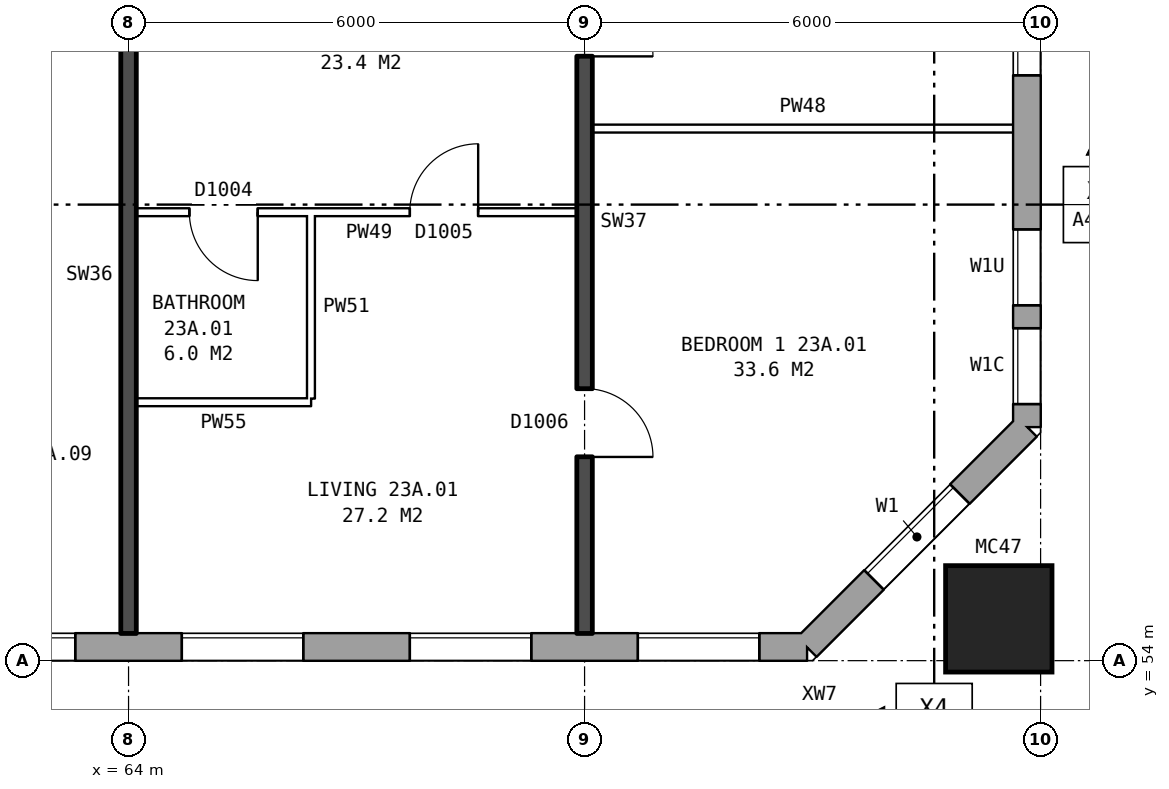
"""IFC4 building model, lengths in metres.
Left out: names, types, materials, properties, quantities, classifications, styles, units other than length and angle.
Written with IfcOpenShell. Run it as: python <this file> out.ifc"""

import sys

from ifc_helpers import new_model, si_unit, direction, frame, frame_2d, origin, origin_2d, place, context, subcontext, project, spatial, rectangle, hollow_rectangle, extrude, element, fill, save


model = new_model("IFC4")
c1 = context("Model", 3, precision=1e-05, world=origin(), true_north=direction((0.0, 1.0)))
c2 = subcontext(c1, "Body", "Model", "MODEL_VIEW")
j1 = project(units=[si_unit("LENGTHUNIT", "METRE"), si_unit("PLANEANGLEUNIT", "RADIAN")], contexts=[c1])
p1 = place(None, origin())
s1 = spatial("IfcSite", under=j1, at=p1, CompositionType="ELEMENT")
p2 = place(p1, origin())
s2 = spatial("IfcBuilding", under=s1, at=p2, CompositionType="ELEMENT")
p3 = place(p2, frame((0.0, 0.0, 84.0)))
s3 = spatial("IfcBuildingStorey", under=s2, at=p3, CompositionType="ELEMENT", Elevation=84.0)
p4 = place(p3, frame((75.45, 54.55, 0.0), z_axis=(0.0, 0.0, 1.0), x_axis=(1.0, 0.0, 0.0)))
e1 = element("IfcColumn", 1, at=p4, inside=s3, PredefinedType="COLUMN", context=c2, shape_type="SweptSolid", body=[
    extrude(hollow_rectangle(XDim=1.4, YDim=1.4, WallThickness=0.075, at=origin_2d()), origin(), (0.0, 0.0, 1.0), 3.1),
])
p5 = place(p3, frame((26.325, 54.18, 0.0), z_axis=(0.0, 0.0, 1.0), x_axis=(1.0, 0.0, 0.0)))
e2 = element("IfcWall", 2, at=p5, inside=s3, PredefinedType="STANDARD", context=c2, shape_type="SweptSolid", body=[
    extrude(rectangle(XDim=46.601, YDim=0.36, at=frame_2d((23.3, 0.0))), origin(), (0.0, 0.0, 1.0), 2.85),
])
p6 = place(p5, frame((2.375, 0.0, 0.8)))
e3 = element("IfcOpeningElement", 3, at=p6, cuts=e2, PredefinedType="OPENING", context=c2, shape_type="SweptSolid", body=[
    extrude(rectangle(XDim=1.6, YDim=1.8, at=frame_2d((0.8, 0.9))), frame((0.0, 0.19, 0.0), z_axis=(0.0, -1.0, 0.0), x_axis=(1.0, 0.0, 0.0)), (0.0, 0.0, 1.0), 0.38),
])
p7 = place(p5, frame((5.375, 0.0, 0.8)))
e4 = element("IfcOpeningElement", 4, at=p7, cuts=e2, PredefinedType="OPENING", context=c2, shape_type="SweptSolid", body=[
    extrude(rectangle(XDim=1.6, YDim=1.8, at=frame_2d((0.8, 0.9))), frame((0.0, 0.19, 0.0), z_axis=(0.0, -1.0, 0.0), x_axis=(1.0, 0.0, 0.0)), (0.0, 0.0, 1.0), 0.38),
])
p8 = place(p5, frame((8.375, 0.0, 0.8)))
e5 = element("IfcOpeningElement", 5, at=p8, cuts=e2, PredefinedType="OPENING", context=c2, shape_type="SweptSolid", body=[
    extrude(rectangle(XDim=1.6, YDim=1.8, at=frame_2d((0.8, 0.9))), frame((0.0, 0.19, 0.0), z_axis=(0.0, -1.0, 0.0), x_axis=(1.0, 0.0, 0.0)), (0.0, 0.0, 1.0), 0.38),
])
p9 = place(p5, frame((11.375, 0.0, 0.8)))
e6 = element("IfcOpeningElement", 6, at=p9, cuts=e2, PredefinedType="OPENING", context=c2, shape_type="SweptSolid", body=[
    extrude(rectangle(XDim=1.6, YDim=1.8, at=frame_2d((0.8, 0.9))), frame((0.0, 0.19, 0.0), z_axis=(0.0, -1.0, 0.0), x_axis=(1.0, 0.0, 0.0)), (0.0, 0.0, 1.0), 0.38),
])
p10 = place(p5, frame((14.375, 0.0, 0.8)))
e7 = element("IfcOpeningElement", 7, at=p10, cuts=e2, PredefinedType="OPENING", context=c2, shape_type="SweptSolid", body=[
    extrude(rectangle(XDim=1.6, YDim=1.8, at=frame_2d((0.8, 0.9))), frame((0.0, 0.19, 0.0), z_axis=(0.0, -1.0, 0.0), x_axis=(1.0, 0.0, 0.0)), (0.0, 0.0, 1.0), 0.38),
])
p11 = place(p5, frame((16.275, 0.0, 1.4)))
e8 = element("IfcOpeningElement", 8, at=p11, cuts=e2, PredefinedType="OPENING", context=c2, shape_type="SweptSolid", body=[
    extrude(rectangle(XDim=1.2, YDim=1.2, at=frame_2d((0.6, 0.6))), frame((0.0, 0.19, 0.0), z_axis=(0.0, -1.0, 0.0), x_axis=(1.0, 0.0, 0.0)), (0.0, 0.0, 1.0), 0.38),
])
p12 = place(p5, frame((20.375, 0.0, 0.8)))
e9 = element("IfcOpeningElement", 9, at=p12, cuts=e2, PredefinedType="OPENING", context=c2, shape_type="SweptSolid", body=[
    extrude(rectangle(XDim=1.6, YDim=1.8, at=frame_2d((0.8, 0.9))), frame((0.0, 0.19, 0.0), z_axis=(0.0, -1.0, 0.0), x_axis=(1.0, 0.0, 0.0)), (0.0, 0.0, 1.0), 0.38),
])
p13 = place(p5, frame((23.375, 0.0, 0.8)))
e10 = element("IfcOpeningElement", 10, at=p13, cuts=e2, PredefinedType="OPENING", context=c2, shape_type="SweptSolid", body=[
    extrude(rectangle(XDim=1.6, YDim=1.8, at=frame_2d((0.8, 0.9))), frame((0.0, 0.19, 0.0), z_axis=(0.0, -1.0, 0.0), x_axis=(1.0, 0.0, 0.0)), (0.0, 0.0, 1.0), 0.38),
])
p14 = place(p5, frame((25.875, 0.0, 0.15)))
e11 = element("IfcOpeningElement", 11, at=p14, cuts=e2, PredefinedType="OPENING", context=c2, shape_type="SweptSolid", body=[
    extrude(rectangle(XDim=1.2, YDim=1.8, at=frame_2d((0.6, 0.9))), frame((0.0, 0.19, 0.0), z_axis=(0.0, -1.0, 0.0), x_axis=(1.0, 0.0, 0.0)), (0.0, 0.0, 1.0), 0.38),
])
p15 = place(p5, frame((28.825, 0.0, 1.7)))
e12 = element("IfcOpeningElement", 12, at=p15, cuts=e2, PredefinedType="OPENING", context=c2, shape_type="SweptSolid", body=[
    extrude(rectangle(XDim=0.6, YDim=0.9, at=frame_2d((0.3, 0.45))), frame((0.0, 0.19, 0.0), z_axis=(0.0, -1.0, 0.0), x_axis=(1.0, 0.0, 0.0)), (0.0, 0.0, 1.0), 0.38),
])
p16 = place(p5, frame((32.375, 0.0, 0.8)))
e13 = element("IfcOpeningElement", 13, at=p16, cuts=e2, PredefinedType="OPENING", context=c2, shape_type="SweptSolid", body=[
    extrude(rectangle(XDim=1.6, YDim=1.8, at=frame_2d((0.8, 0.9))), frame((0.0, 0.19, 0.0), z_axis=(0.0, -1.0, 0.0), x_axis=(1.0, 0.0, 0.0)), (0.0, 0.0, 1.0), 0.38),
])
p17 = place(p5, frame((35.375, 0.0, 0.8)))
e14 = element("IfcOpeningElement", 14, at=p17, cuts=e2, PredefinedType="OPENING", context=c2, shape_type="SweptSolid", body=[
    extrude(rectangle(XDim=1.6, YDim=1.8, at=frame_2d((0.8, 0.9))), frame((0.0, 0.19, 0.0), z_axis=(0.0, -1.0, 0.0), x_axis=(1.0, 0.0, 0.0)), (0.0, 0.0, 1.0), 0.38),
])
p18 = place(p5, frame((38.375, 0.0, 0.8)))
e15 = element("IfcOpeningElement", 15, at=p18, cuts=e2, PredefinedType="OPENING", context=c2, shape_type="SweptSolid", body=[
    extrude(rectangle(XDim=1.6, YDim=1.8, at=frame_2d((0.8, 0.9))), frame((0.0, 0.19, 0.0), z_axis=(0.0, -1.0, 0.0), x_axis=(1.0, 0.0, 0.0)), (0.0, 0.0, 1.0), 0.38),
])
p19 = place(p5, frame((41.375, 0.0, 0.8)))
e16 = element("IfcOpeningElement", 16, at=p19, cuts=e2, PredefinedType="OPENING", context=c2, shape_type="SweptSolid", body=[
    extrude(rectangle(XDim=1.6, YDim=1.8, at=frame_2d((0.8, 0.9))), frame((0.0, 0.19, 0.0), z_axis=(0.0, -1.0, 0.0), x_axis=(1.0, 0.0, 0.0)), (0.0, 0.0, 1.0), 0.38),
])
p20 = place(p5, frame((44.375, 0.0, 0.8)))
e17 = element("IfcOpeningElement", 17, at=p20, cuts=e2, PredefinedType="OPENING", context=c2, shape_type="SweptSolid", body=[
    extrude(rectangle(XDim=1.6, YDim=1.8, at=frame_2d((0.8, 0.9))), frame((0.0, 0.19, 0.0), z_axis=(0.0, -1.0, 0.0), x_axis=(1.0, 0.0, 0.0)), (0.0, 0.0, 1.0), 0.38),
])
p21 = place(p5, frame((27.375, 0.0, 0.15)))
e18 = element("IfcOpeningElement", 18, at=p21, cuts=e2, PredefinedType="OPENING", context=c2, shape_type="SweptSolid", body=[
    extrude(rectangle(XDim=0.8, YDim=0.9, at=frame_2d((0.4, 0.45))), frame((0.0, 0.19, 0.0), z_axis=(0.0, -1.0, 0.0), x_axis=(1.0, 0.0, 0.0)), (0.0, 0.0, 1.0), 0.38),
])
p22 = place(p5, frame((29.775, 0.0, 0.8)))
e19 = element("IfcOpeningElement", 19, at=p22, cuts=e2, PredefinedType="OPENING", context=c2, shape_type="SweptSolid", body=[
    extrude(rectangle(XDim=1.6, YDim=1.8, at=frame_2d((0.8, 0.9))), frame((0.0, 0.19, 0.0), z_axis=(0.0, -1.0, 0.0), x_axis=(1.0, 0.0, 0.0)), (0.0, 0.0, 1.0), 0.38),
])
p23 = place(p3, frame((72.925, 54.18, 0.0), z_axis=(0.0, 0.0, 1.0), x_axis=(0.707106781187, 0.707106781187, 0.0)))
e20 = element("IfcWall", 20, at=p23, inside=s3, PredefinedType="STANDARD", context=c2, shape_type="SweptSolid", body=[
    extrude(rectangle(XDim=4.094, YDim=0.36, at=frame_2d((2.047, 0.0))), origin(), (0.0, 0.0, 1.0), 2.85),
])
p24 = place(p23, frame((1.247, 0.0, 0.8)))
e21 = element("IfcOpeningElement", 21, at=p24, cuts=e20, PredefinedType="OPENING", context=c2, shape_type="SweptSolid", body=[
    extrude(rectangle(XDim=1.6, YDim=1.8, at=frame_2d((0.8, 0.9))), frame((0.0, 0.19, 0.0), z_axis=(0.0, -1.0, 0.0), x_axis=(1.0, 0.0, 0.0)), (0.0, 0.0, 1.0), 0.38),
])
p25 = place(p3, frame((75.82, 57.075, 0.0), z_axis=(0.0, 0.0, 1.0), x_axis=(0.0, 1.0, 0.0)))
e22 = element("IfcWall", 22, at=p25, inside=s3, PredefinedType="STANDARD", context=c2, shape_type="SweptSolid", body=[
    extrude(rectangle(XDim=25.851, YDim=0.36, at=frame_2d((12.925, 0.0))), origin(), (0.0, 0.0, 1.0), 2.85),
])
p26 = place(p25, frame((0.3, 0.0, 0.8)))
e23 = element("IfcOpeningElement", 23, at=p26, cuts=e22, PredefinedType="OPENING", context=c2, shape_type="SweptSolid", body=[
    extrude(rectangle(XDim=1.0, YDim=1.8, at=frame_2d((0.5, 0.9))), frame((0.0, 0.19, 0.0), z_axis=(0.0, -1.0, 0.0), x_axis=(1.0, 0.0, 0.0)), (0.0, 0.0, 1.0), 0.38),
])
p27 = place(p25, frame((4.625, 0.0, 0.8)))
e24 = element("IfcOpeningElement", 24, at=p27, cuts=e22, PredefinedType="OPENING", context=c2, shape_type="SweptSolid", body=[
    extrude(rectangle(XDim=1.6, YDim=1.8, at=frame_2d((0.8, 0.9))), frame((0.0, 0.19, 0.0), z_axis=(0.0, -1.0, 0.0), x_axis=(1.0, 0.0, 0.0)), (0.0, 0.0, 1.0), 0.38),
])
p28 = place(p25, frame((19.625, 0.0, 0.8)))
e25 = element("IfcOpeningElement", 25, at=p28, cuts=e22, PredefinedType="OPENING", context=c2, shape_type="SweptSolid", body=[
    extrude(rectangle(XDim=1.6, YDim=1.8, at=frame_2d((0.8, 0.9))), frame((0.0, 0.19, 0.0), z_axis=(0.0, -1.0, 0.0), x_axis=(1.0, 0.0, 0.0)), (0.0, 0.0, 1.0), 0.38),
])
p29 = place(p25, frame((23.125, 0.0, 0.8)))
e26 = element("IfcOpeningElement", 26, at=p29, cuts=e22, PredefinedType="OPENING", context=c2, shape_type="SweptSolid", body=[
    extrude(rectangle(XDim=1.0, YDim=0.9, at=frame_2d((0.5, 0.45))), frame((0.0, 0.19, 0.0), z_axis=(0.0, -1.0, 0.0), x_axis=(1.0, 0.0, 0.0)), (0.0, 0.0, 1.0), 0.38),
])
p30 = place(p25, frame((1.6, 0.0, 0.8)))
e27 = element("IfcOpeningElement", 27, at=p30, cuts=e22, PredefinedType="OPENING", context=c2, shape_type="SweptSolid", body=[
    extrude(rectangle(XDim=1.0, YDim=0.9, at=frame_2d((0.5, 0.45))), frame((0.0, 0.19, 0.0), z_axis=(0.0, -1.0, 0.0), x_axis=(1.0, 0.0, 0.0)), (0.0, 0.0, 1.0), 0.38),
])
p31 = place(p25, frame((24.425, 0.0, 0.8)))
e28 = element("IfcOpeningElement", 28, at=p31, cuts=e22, PredefinedType="OPENING", context=c2, shape_type="SweptSolid", body=[
    extrude(rectangle(XDim=1.0, YDim=1.8, at=frame_2d((0.5, 0.9))), frame((0.0, 0.19, 0.0), z_axis=(0.0, -1.0, 0.0), x_axis=(1.0, 0.0, 0.0)), (0.0, 0.0, 1.0), 0.38),
])
p32 = place(p3, frame((64.1, 57.4, 0.0), z_axis=(0.0, 0.0, 1.0), x_axis=(1.0, 0.0, 0.0)))
e29 = element("IfcWall", 29, at=p32, inside=s3, PredefinedType="PARTITIONING", context=c2, shape_type="SweptSolid", body=[
    extrude(rectangle(XDim=2.3, YDim=0.1, at=frame_2d((1.15, 0.0))), origin(), (0.0, 0.0, 1.0), 2.85),
])
p33 = place(p3, frame((64.1, 59.9, 0.0), z_axis=(0.0, 0.0, 1.0), x_axis=(1.0, 0.0, 0.0)))
e30 = element("IfcWall", 30, at=p33, inside=s3, PredefinedType="PARTITIONING", context=c2, shape_type="SweptSolid", body=[
    extrude(rectangle(XDim=5.8, YDim=0.1, at=frame_2d((2.9, 0.0))), origin(), (0.0, 0.0, 1.0), 2.85),
])
p34 = place(p33, frame((3.6, 0.0, 0.0)))
e31 = element("IfcOpeningElement", 31, at=p34, cuts=e30, PredefinedType="OPENING", context=c2, shape_type="SweptSolid", body=[
    extrude(rectangle(XDim=0.9, YDim=2.1, at=frame_2d((0.45, 1.05))), frame((0.0, 0.06, 0.0), z_axis=(0.0, -1.0, 0.0), x_axis=(1.0, 0.0, 0.0)), (0.0, 0.0, 1.0), 0.12),
])
p35 = place(p33, frame((0.7, 0.0, 0.0)))
e32 = element("IfcOpeningElement", 32, at=p35, cuts=e30, PredefinedType="OPENING", context=c2, shape_type="SweptSolid", body=[
    extrude(rectangle(XDim=0.9, YDim=2.1, at=frame_2d((0.45, 1.05))), frame((0.0, 0.06, 0.0), z_axis=(0.0, -1.0, 0.0), x_axis=(1.0, 0.0, 0.0)), (0.0, 0.0, 1.0), 0.12),
])
p36 = place(p3, frame((70.1, 61.0, 0.0), z_axis=(0.0, 0.0, 1.0), x_axis=(1.0, 0.0, 0.0)))
e33 = element("IfcWall", 33, at=p36, inside=s3, PredefinedType="PARTITIONING", context=c2, shape_type="SweptSolid", body=[
    extrude(rectangle(XDim=5.54, YDim=0.1, at=frame_2d((2.77, 0.0))), origin(), (0.0, 0.0, 1.0), 2.85),
])
p37 = place(p3, frame((64.0, 54.36, 0.0), z_axis=(0.0, 0.0, 1.0), x_axis=(0.0, 1.0, 0.0)))
e34 = element("IfcWall", 34, at=p37, inside=s3, PredefinedType="SOLIDWALL", context=c2, shape_type="SweptSolid", body=[
    extrude(rectangle(XDim=9.44, YDim=0.2, at=frame_2d((4.72, 0.0))), origin(), (0.0, 0.0, 1.0), 2.85),
])
p38 = place(p3, frame((66.4, 57.45, 0.0), z_axis=(0.0, 0.0, 1.0), x_axis=(0.0, 1.0, 0.0)))
e35 = element("IfcWall", 35, at=p38, inside=s3, PredefinedType="PARTITIONING", context=c2, shape_type="SweptSolid", body=[
    extrude(rectangle(XDim=2.4, YDim=0.1, at=frame_2d((1.2, 0.0))), origin(), (0.0, 0.0, 1.0), 2.85),
])
p39 = place(p3, frame((70.0, 54.36, 0.0), z_axis=(0.0, 0.0, 1.0), x_axis=(0.0, 1.0, 0.0)))
e36 = element("IfcWall", 36, at=p39, inside=s3, PredefinedType="SOLIDWALL", context=c2, shape_type="SweptSolid", body=[
    extrude(rectangle(XDim=9.44, YDim=0.2, at=frame_2d((4.72, 0.0))), origin(), (0.0, 0.0, 1.0), 2.85),
])
p40 = place(p39, frame((2.32, 0.0, 0.0)))
e37 = element("IfcOpeningElement", 37, at=p40, cuts=e36, PredefinedType="OPENING", context=c2, shape_type="SweptSolid", body=[
    extrude(rectangle(XDim=0.9, YDim=2.1, at=frame_2d((0.45, 1.05))), frame((0.0, 0.11, 0.0), z_axis=(0.0, -1.0, 0.0), x_axis=(1.0, 0.0, 0.0)), (0.0, 0.0, 1.0), 0.22),
])
p41 = place(p39, frame((7.59, 0.0, 0.0)))
e38 = element("IfcOpeningElement", 38, at=p41, cuts=e36, PredefinedType="OPENING", context=c2, shape_type="SweptSolid", body=[
    extrude(rectangle(XDim=0.9, YDim=2.1, at=frame_2d((0.45, 1.05))), frame((0.0, 0.11, 0.0), z_axis=(0.0, -1.0, 0.0), x_axis=(1.0, 0.0, 0.0)), (0.0, 0.0, 1.0), 0.22),
])
p42 = place(p17, origin())
e39 = element("IfcWindow", 39, at=p42, inside=s3, PartitioningType="SINGLE_PANEL", PredefinedType="WINDOW", context=c2, shape_type="SweptSolid", body=[
    extrude(rectangle(XDim=1.6, YDim=1.8, at=frame_2d((0.8, 0.9))), frame((0.0, 0.15, 0.0), z_axis=(0.0, -1.0, 0.0), x_axis=(1.0, 0.0, 0.0)), (0.0, 0.0, 1.0), 0.06),
])
fill(e14, e39)
p43 = place(p18, origin())
e40 = element("IfcWindow", 40, at=p43, inside=s3, PartitioningType="SINGLE_PANEL", PredefinedType="WINDOW", context=c2, shape_type="SweptSolid", body=[
    extrude(rectangle(XDim=1.6, YDim=1.8, at=frame_2d((0.8, 0.9))), frame((0.0, 0.15, 0.0), z_axis=(0.0, -1.0, 0.0), x_axis=(1.0, 0.0, 0.0)), (0.0, 0.0, 1.0), 0.06),
])
fill(e15, e40)
p44 = place(p19, origin())
e41 = element("IfcWindow", 41, at=p44, inside=s3, PartitioningType="SINGLE_PANEL", PredefinedType="WINDOW", context=c2, shape_type="SweptSolid", body=[
    extrude(rectangle(XDim=1.6, YDim=1.8, at=frame_2d((0.8, 0.9))), frame((0.0, 0.15, 0.0), z_axis=(0.0, -1.0, 0.0), x_axis=(1.0, 0.0, 0.0)), (0.0, 0.0, 1.0), 0.06),
])
fill(e16, e41)
p45 = place(p20, origin())
e42 = element("IfcWindow", 42, at=p45, inside=s3, PartitioningType="SINGLE_PANEL", PredefinedType="WINDOW", context=c2, shape_type="SweptSolid", body=[
    extrude(rectangle(XDim=1.6, YDim=1.8, at=frame_2d((0.8, 0.9))), frame((0.0, 0.15, 0.0), z_axis=(0.0, -1.0, 0.0), x_axis=(1.0, 0.0, 0.0)), (0.0, 0.0, 1.0), 0.06),
])
fill(e17, e42)
p46 = place(p24, origin())
e43 = element("IfcWindow", 43, at=p46, inside=s3, PartitioningType="SINGLE_PANEL", PredefinedType="WINDOW", context=c2, shape_type="SweptSolid", body=[
    extrude(rectangle(XDim=1.6, YDim=1.8, at=frame_2d((0.8, 0.9))), frame((0.0, 0.15, 0.0), z_axis=(0.0, -1.0, 0.0), x_axis=(1.0, 0.0, 0.0)), (0.0, 0.0, 1.0), 0.06),
])
fill(e21, e43)
p47 = place(p26, origin())
e44 = element("IfcWindow", 44, at=p47, inside=s3, PartitioningType="SINGLE_PANEL", PredefinedType="WINDOW", context=c2, shape_type="SweptSolid", body=[
    extrude(rectangle(XDim=1.0, YDim=1.8, at=frame_2d((0.5, 0.9))), frame((0.0, 0.15, 0.0), z_axis=(0.0, -1.0, 0.0), x_axis=(1.0, 0.0, 0.0)), (0.0, 0.0, 1.0), 0.06),
])
fill(e23, e44)
p48 = place(p27, origin())
e45 = element("IfcWindow", 45, at=p48, inside=s3, PartitioningType="SINGLE_PANEL", PredefinedType="WINDOW", context=c2, shape_type="SweptSolid", body=[
    extrude(rectangle(XDim=1.6, YDim=1.8, at=frame_2d((0.8, 0.9))), frame((0.0, 0.15, 0.0), z_axis=(0.0, -1.0, 0.0), x_axis=(1.0, 0.0, 0.0)), (0.0, 0.0, 1.0), 0.06),
])
fill(e24, e45)
p49 = place(p40, frame((0.9, 0.0, 0.0), z_axis=(0.0, 0.0, 1.0), x_axis=(-1.0, 0.0, 0.0)))
e46 = element("IfcDoor", 46, at=p49, inside=s3, OperationType="SINGLE_SWING_RIGHT", PredefinedType="DOOR", context=c2, shape_type="SweptSolid", body=[
    extrude(rectangle(XDim=0.9, YDim=2.1, at=frame_2d((0.45, 1.05))), frame((0.0, 0.025, 0.0), z_axis=(0.0, -1.0, 0.0), x_axis=(1.0, 0.0, 0.0)), (0.0, 0.0, 1.0), 0.05),
])
fill(e37, e46)
p50 = place(p41, frame((0.9, 0.0, 0.0), z_axis=(0.0, 0.0, 1.0), x_axis=(-1.0, 0.0, 0.0)))
e47 = element("IfcDoor", 47, at=p50, inside=s3, OperationType="SINGLE_SWING_RIGHT", PredefinedType="DOOR", context=c2, shape_type="SweptSolid", body=[
    extrude(rectangle(XDim=0.9, YDim=2.1, at=frame_2d((0.45, 1.05))), frame((0.0, 0.025, 0.0), z_axis=(0.0, -1.0, 0.0), x_axis=(1.0, 0.0, 0.0)), (0.0, 0.0, 1.0), 0.05),
])
fill(e38, e47)
p51 = place(p34, origin())
e48 = element("IfcDoor", 48, at=p51, inside=s3, OperationType="SINGLE_SWING_RIGHT", PredefinedType="DOOR", context=c2, shape_type="SweptSolid", body=[
    extrude(rectangle(XDim=0.9, YDim=2.1, at=frame_2d((0.45, 1.05))), frame((0.0, 0.025, 0.0), z_axis=(0.0, -1.0, 0.0), x_axis=(1.0, 0.0, 0.0)), (0.0, 0.0, 1.0), 0.05),
])
fill(e31, e48)
p52 = place(p35, frame((0.9, 0.0, 0.0), z_axis=(0.0, 0.0, 1.0), x_axis=(-1.0, 0.0, 0.0)))
e49 = element("IfcDoor", 49, at=p52, inside=s3, OperationType="SINGLE_SWING_LEFT", PredefinedType="DOOR", context=c2, shape_type="SweptSolid", body=[
    extrude(rectangle(XDim=0.9, YDim=2.1, at=frame_2d((0.45, 1.05))), frame((0.0, 0.025, 0.0), z_axis=(0.0, -1.0, 0.0), x_axis=(1.0, 0.0, 0.0)), (0.0, 0.0, 1.0), 0.05),
])
fill(e32, e49)
p53 = place(p30, origin())
e50 = element("IfcWindow", 50, at=p53, inside=s3, PartitioningType="SINGLE_PANEL", PredefinedType="WINDOW", context=c2, shape_type="SweptSolid", body=[
    extrude(rectangle(XDim=1.0, YDim=0.9, at=frame_2d((0.5, 0.45))), frame((0.0, 0.15, 0.0), z_axis=(0.0, -1.0, 0.0), x_axis=(1.0, 0.0, 0.0)), (0.0, 0.0, 1.0), 0.06),
])
fill(e27, e50)
save(model, sys.argv[1])
